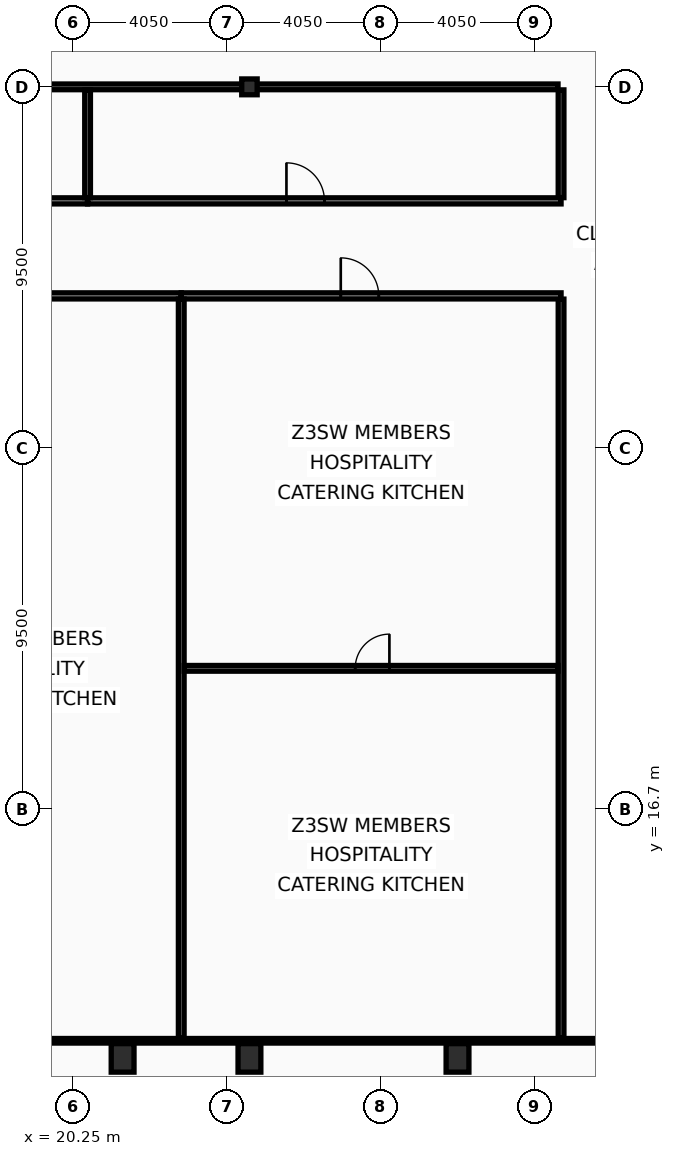
"""IFC4 building model, lengths in metres.
Left out: names, types, materials, properties, quantities, classifications, styles, units other than length and angle.
Written with IfcOpenShell. Run it as: python <this file> out.ifc"""

import sys

from ifc_helpers import new_model, si_unit, direction, frame, frame_2d, origin, origin_2d, place, context, subcontext, project, spatial, rectangle, hollow_rectangle, i_section, extrude, element, fill, save


model = new_model("IFC4")
c1 = context("Model", 3, precision=1e-05, world=origin(), true_north=direction((0.0, 1.0)))
c2 = subcontext(c1, "Body", "Model", "MODEL_VIEW")
j1 = project(units=[si_unit("LENGTHUNIT", "METRE"), si_unit("PLANEANGLEUNIT", "RADIAN")], contexts=[c1])
p1 = place(None, origin())
s1 = spatial("IfcSite", under=j1, at=p1, CompositionType="ELEMENT")
p2 = place(p1, origin())
s2 = spatial("IfcBuilding", under=s1, at=p2, CompositionType="ELEMENT")
p3 = place(p2, frame((0.0, 0.0, 221.0)))
s3 = spatial("IfcBuildingStorey", under=s2, at=p3, CompositionType="ELEMENT", Elevation=221.0)
for number, where, z_axis, x_axis in (
    (1, (21.562, 10.15, 0.0), (0.0, 0.0, 1.0), (1.0, 0.0, 0.0)),
    (2, (24.9, 10.15, 0.0), (0.0, 0.0, 1.0), (1.0, 0.0, 0.0)),
    (3, (30.375, 10.15, 0.0), (0.0, 0.0, 1.0), (1.0, 0.0, 0.0)),
):
    element("IfcColumn", number, at=place(p3, frame(where, z_axis=z_axis, x_axis=x_axis)), inside=s3, PredefinedType="COLUMN", context=c2, shape_type="SweptSolid", body=[
        extrude(hollow_rectangle(XDim=0.6, YDim=0.75, WallThickness=0.045, at=origin_2d()), origin(), (0.0, 0.0, 1.0), 3.6),
    ])
p4 = place(p3, frame((24.9, 35.7, 0.0), z_axis=(0.0, 0.0, 1.0), x_axis=(1.0, 0.0, 0.0)))
e4 = element("IfcColumn", 4, at=p4, inside=s3, PredefinedType="COLUMN", context=c2, shape_type="SweptSolid", body=[
    extrude(i_section(OverallWidth=0.406, OverallDepth=0.416, WebThickness=0.03, FlangeThickness=0.048, at=origin_2d()), origin(), (0.0, 0.0, 1.0), 3.6),
])
p5 = place(p3, frame((33.1, 10.665, 0.0), z_axis=(0.0, 0.0, 1.0), x_axis=(0.0, 1.0, 0.0)))
e5 = element("IfcWall", 5, at=p5, inside=s3, PredefinedType="PARTITIONING", context=c2, shape_type="SweptSolid", body=[
    extrude(rectangle(XDim=19.45, YDim=0.15, at=frame_2d((9.725, 0.0))), origin(), (0.0, 0.0, 1.0), 2.98),
])
p6 = place(p3, frame((33.1, 32.785, 0.0), z_axis=(0.0, 0.0, 1.0), x_axis=(0.0, 1.0, 0.0)))
e6 = element("IfcWall", 6, at=p6, inside=s3, PredefinedType="PARTITIONING", context=c2, shape_type="SweptSolid", body=[
    extrude(rectangle(XDim=2.835, YDim=0.15, at=frame_2d((1.417, 0.0))), origin(), (0.0, 0.0, 1.0), 2.98),
])
p7 = place(p3, frame((8.095, 35.7, 0.0), z_axis=(0.0, 0.0, 1.0), x_axis=(1.0, 0.0, 0.0)))
e7 = element("IfcWall", 7, at=p7, inside=s3, PredefinedType="PARTITIONING", context=c2, shape_type="SweptSolid", body=[
    extrude(rectangle(XDim=24.925, YDim=0.15, at=frame_2d((12.462, 0.0))), origin(), (0.0, 0.0, 1.0), 2.78),
])
p8 = place(p3, frame((14.797, 30.2, 0.0), z_axis=(0.0, 0.0, 1.0), x_axis=(1.0, 0.0, 0.0)))
e8 = element("IfcWall", 8, at=p8, inside=s3, PredefinedType="PARTITIONING", context=c2, shape_type="SweptSolid", body=[
    extrude(rectangle(XDim=8.308, YDim=0.16, at=frame_2d((4.154, 0.0))), origin(), (0.0, 0.0, 1.0), 2.78),
])
p9 = place(p8, frame((3.49, 0.0, 0.0)))
e9 = element("IfcOpeningElement", 9, at=p9, cuts=e8, PredefinedType="OPENING", context=c2, shape_type="SweptSolid", body=[
    extrude(rectangle(XDim=1.0, YDim=2.05, at=frame_2d((0.5, 1.025))), frame((0.0, 0.09, 0.0), z_axis=(0.0, -1.0, 0.0), x_axis=(1.0, 0.0, 0.0)), (0.0, 0.0, 1.0), 0.18),
])
p10 = place(p3, frame((23.105, 30.2, 0.0), z_axis=(0.0, 0.0, 1.0), x_axis=(1.0, 0.0, 0.0)))
e10 = element("IfcWall", 10, at=p10, inside=s3, PredefinedType="PARTITIONING", context=c2, shape_type="SweptSolid", body=[
    extrude(rectangle(XDim=9.995, YDim=0.16, at=frame_2d((4.998, 0.0))), origin(), (0.0, 0.0, 1.0), 2.78),
])
p11 = place(p10, frame((4.198, 0.0, 0.0)))
e11 = element("IfcOpeningElement", 11, at=p11, cuts=e10, PredefinedType="OPENING", context=c2, shape_type="SweptSolid", body=[
    extrude(rectangle(XDim=1.0, YDim=2.05, at=frame_2d((0.5, 1.025))), frame((0.0, 0.09, 0.0), z_axis=(0.0, -1.0, 0.0), x_axis=(1.0, 0.0, 0.0)), (0.0, 0.0, 1.0), 0.18),
])
p12 = place(p3, frame((23.105, 10.665, 0.0), z_axis=(0.0, 0.0, 1.0), x_axis=(0.0, 1.0, 0.0)))
e12 = element("IfcWall", 12, at=p12, inside=s3, PredefinedType="PARTITIONING", context=c2, shape_type="SweptSolid", body=[
    extrude(rectangle(XDim=19.45, YDim=0.15, at=frame_2d((9.725, 0.0))), origin(), (0.0, 0.0, 1.0), 2.98),
])
p13 = place(p3, frame((23.185, 20.4, 0.0), z_axis=(0.0, 0.0, 1.0), x_axis=(1.0, 0.0, 0.0)))
e13 = element("IfcWall", 13, at=p13, inside=s3, PredefinedType="PARTITIONING", context=c2, shape_type="SweptSolid", body=[
    extrude(rectangle(XDim=9.835, YDim=0.15, at=frame_2d((4.917, 0.0))), origin(), (0.0, 0.0, 1.0), 2.78),
])
p14 = place(p13, frame((4.498, 0.0, 0.0)))
e14 = element("IfcOpeningElement", 14, at=p14, cuts=e13, PredefinedType="OPENING", context=c2, shape_type="SweptSolid", body=[
    extrude(rectangle(XDim=0.9, YDim=2.05, at=frame_2d((0.45, 1.025))), frame((0.0, 0.085, 0.0), z_axis=(0.0, -1.0, 0.0), x_axis=(1.0, 0.0, 0.0)), (0.0, 0.0, 1.0), 0.17),
])
p15 = place(p3, frame((8.03, 32.7, 0.0), z_axis=(0.0, 0.0, 1.0), x_axis=(1.0, 0.0, 0.0)))
e15 = element("IfcWall", 15, at=p15, inside=s3, PredefinedType="PARTITIONING", context=c2, shape_type="SweptSolid", body=[
    extrude(rectangle(XDim=12.611, YDim=0.16, at=frame_2d((6.305, 0.0))), origin(), (0.0, 0.0, 1.0), 2.78),
])
p16 = place(p15, frame((5.296, 0.0, 0.0)))
e16 = element("IfcOpeningElement", 16, at=p16, cuts=e15, PredefinedType="OPENING", context=c2, shape_type="SweptSolid", body=[
    extrude(rectangle(XDim=1.0, YDim=2.05, at=frame_2d((0.5, 1.025))), frame((0.0, 0.09, 0.0), z_axis=(0.0, -1.0, 0.0), x_axis=(1.0, 0.0, 0.0)), (0.0, 0.0, 1.0), 0.18),
])
p17 = place(p3, frame((20.641, 32.7, 0.0), z_axis=(0.0, 0.0, 1.0), x_axis=(1.0, 0.0, 0.0)))
e17 = element("IfcWall", 17, at=p17, inside=s3, PredefinedType="PARTITIONING", context=c2, shape_type="SweptSolid", body=[
    extrude(rectangle(XDim=12.459, YDim=0.16, at=frame_2d((6.23, 0.0))), origin(), (0.0, 0.0, 1.0), 2.78),
])
p18 = place(p17, frame((5.233, 0.0, 0.0)))
e18 = element("IfcOpeningElement", 18, at=p18, cuts=e17, PredefinedType="OPENING", context=c2, shape_type="SweptSolid", body=[
    extrude(rectangle(XDim=1.0, YDim=2.05, at=frame_2d((0.5, 1.025))), frame((0.0, 0.09, 0.0), z_axis=(0.0, -1.0, 0.0), x_axis=(1.0, 0.0, 0.0)), (0.0, 0.0, 1.0), 0.18),
])
p19 = place(p3, frame((20.641, 32.785, 0.0), z_axis=(0.0, 0.0, 1.0), x_axis=(0.0, 1.0, 0.0)))
e19 = element("IfcWall", 19, at=p19, inside=s3, PredefinedType="PARTITIONING", context=c2, shape_type="SweptSolid", body=[
    extrude(rectangle(XDim=2.835, YDim=0.15, at=frame_2d((1.417, 0.0))), origin(), (0.0, 0.0, 1.0), 2.98),
])
p20 = place(p3, frame((8.095, 10.6, 0.0), z_axis=(0.0, 0.0, 1.0), x_axis=(1.0, 0.0, 0.0)))
e20 = element("IfcWall", 20, at=p20, inside=s3, PredefinedType="PARTITIONING", context=c2, shape_type="SweptSolid", body=[
    extrude(rectangle(XDim=56.71, YDim=0.12, at=frame_2d((28.355, 0.0))), origin(), (0.0, 0.0, 1.0), 2.78),
])
p21 = place(p11, origin())
e21 = element("IfcDoor", 21, at=p21, inside=s3, OperationType="SINGLE_SWING_LEFT", PredefinedType="DOOR", context=c2, shape_type="SweptSolid", body=[
    extrude(rectangle(XDim=1.0, YDim=2.05, at=frame_2d((0.5, 1.025))), frame((0.0, 0.025, 0.0), z_axis=(0.0, -1.0, 0.0), x_axis=(1.0, 0.0, 0.0)), (0.0, 0.0, 1.0), 0.05),
])
fill(e11, e21)
p22 = place(p14, origin())
e22 = element("IfcDoor", 22, at=p22, inside=s3, OperationType="SINGLE_SWING_RIGHT", PredefinedType="DOOR", context=c2, shape_type="SweptSolid", body=[
    extrude(rectangle(XDim=0.9, YDim=2.05, at=frame_2d((0.45, 1.025))), frame((0.0, 0.025, 0.0), z_axis=(0.0, -1.0, 0.0), x_axis=(1.0, 0.0, 0.0)), (0.0, 0.0, 1.0), 0.05),
])
fill(e14, e22)
p23 = place(p18, origin())
e23 = element("IfcDoor", 23, at=p23, inside=s3, OperationType="SINGLE_SWING_LEFT", PredefinedType="DOOR", context=c2, shape_type="SweptSolid", body=[
    extrude(rectangle(XDim=1.0, YDim=2.05, at=frame_2d((0.5, 1.025))), frame((0.0, 0.025, 0.0), z_axis=(0.0, -1.0, 0.0), x_axis=(1.0, 0.0, 0.0)), (0.0, 0.0, 1.0), 0.05),
])
fill(e18, e23)
save(model, sys.argv[1])
